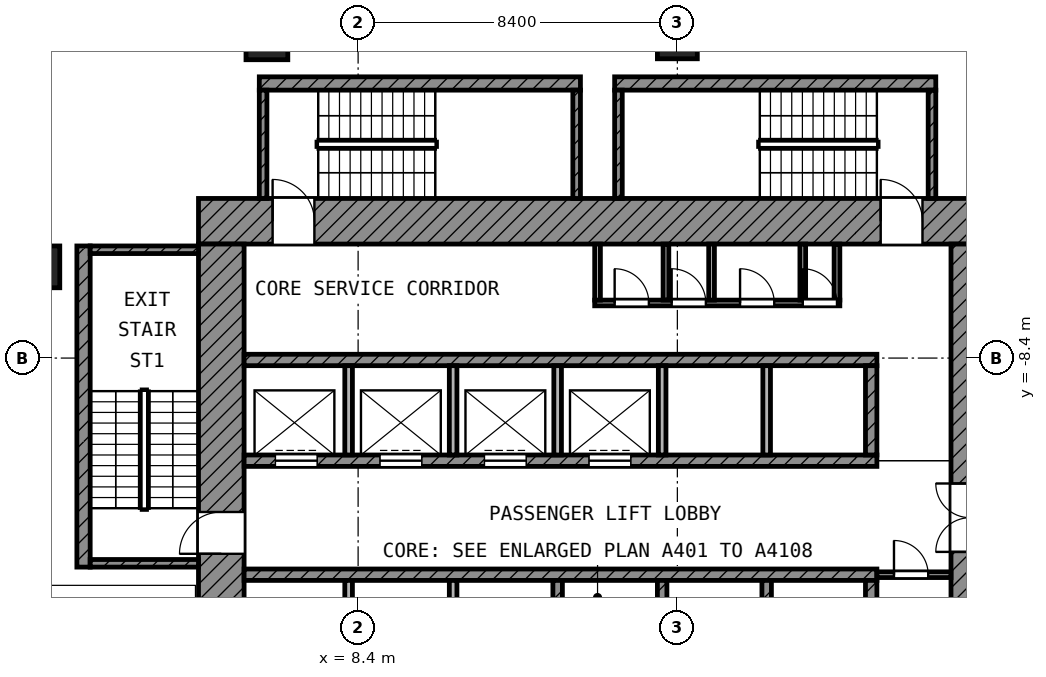
"""IFC4 building model, lengths in metres.
Left out: names, types, materials, properties, quantities, classifications, styles, units other than length and angle.
Written with IfcOpenShell. Run it as: python <this file> out.ifc"""

import sys

from ifc_helpers import new_model, si_unit, direction, frame, frame_2d, origin, origin_2d, place, context, subcontext, project, spatial, rectangle, extrude, element, fill, save


model = new_model("IFC4")
c1 = context("Model", 3, precision=1e-05, world=origin(), true_north=direction((0.0, 1.0)))
c2 = subcontext(c1, "Body", "Model", "MODEL_VIEW")
j1 = project(units=[si_unit("LENGTHUNIT", "METRE"), si_unit("PLANEANGLEUNIT", "RADIAN")], contexts=[c1])
p1 = place(None, origin())
s1 = spatial("IfcSite", under=j1, at=p1, CompositionType="ELEMENT")
p2 = place(p1, origin())
s2 = spatial("IfcBuilding", under=s1, at=p2, CompositionType="ELEMENT")
p3 = place(p2, frame((0.0, 0.0, 107.2)))
s3 = spatial("IfcBuildingStorey", under=s2, at=p3, CompositionType="ELEMENT", Elevation=107.2)
p4 = place(p3, frame((6.0, 0.0, 0.0), z_axis=(0.0, 0.0, 1.0), x_axis=(1.0, 0.0, 0.0)))
e1 = element("IfcColumn", 1, at=p4, inside=s3, PredefinedType="COLUMN", context=c2, shape_type="SweptSolid", body=[
    extrude(rectangle(XDim=1.1, YDim=1.1, at=origin_2d()), origin(), (0.0, 0.0, 1.0), 4.2),
])
p5 = place(p3, frame((16.8, 0.0, 0.0), z_axis=(0.0, 0.0, 1.0), x_axis=(1.0, 0.0, 0.0)))
e2 = element("IfcColumn", 2, at=p5, inside=s3, PredefinedType="COLUMN", context=c2, shape_type="SweptSolid", body=[
    extrude(rectangle(XDim=1.05, YDim=1.05, at=origin_2d()), origin(), (0.0, 0.0, 1.0), 4.2),
])
p6 = place(p3, frame((0.0, -6.0, 0.0), z_axis=(0.0, 0.0, 1.0), x_axis=(1.0, 0.0, 0.0)))
e3 = element("IfcColumn", 3, at=p6, inside=s3, PredefinedType="COLUMN", context=c2, shape_type="SweptSolid", body=[
    extrude(rectangle(XDim=1.1, YDim=1.1, at=origin_2d()), origin(), (0.0, 0.0, 1.0), 4.2),
])
p7 = place(p3, frame((4.2, -4.8, 0.0), z_axis=(0.0, 0.0, 1.0), x_axis=(1.0, 0.0, 0.0)))
e4 = element("IfcWall", 4, at=p7, inside=s3, PredefinedType="SHEAR", context=c2, shape_type="SweptSolid", body=[
    extrude(rectangle(XDim=20.8, YDim=1.2, at=frame_2d((10.4, 0.0))), origin(), (0.0, 0.0, 1.0), 3.6),
])
p8 = place(p7, frame((1.95, 0.0, 0.0)))
e5 = element("IfcOpeningElement", 5, at=p8, cuts=e4, PredefinedType="OPENING", context=c2, shape_type="SweptSolid", body=[
    extrude(rectangle(XDim=1.1, YDim=2.1, at=frame_2d((0.55, 1.05))), frame((0.0, 0.61, 0.0), z_axis=(0.0, -1.0, 0.0), x_axis=(1.0, 0.0, 0.0)), (0.0, 0.0, 1.0), 1.22),
])
p9 = place(p7, frame((17.95, 0.0, 0.0)))
e6 = element("IfcOpeningElement", 6, at=p9, cuts=e4, PredefinedType="OPENING", context=c2, shape_type="SweptSolid", body=[
    extrude(rectangle(XDim=1.1, YDim=2.1, at=frame_2d((0.55, 1.05))), frame((0.0, 0.61, 0.0), z_axis=(0.0, -1.0, 0.0), x_axis=(1.0, 0.0, 0.0)), (0.0, 0.0, 1.0), 1.22),
])
p10 = place(p3, frame((4.8, -25.0, 0.0), z_axis=(0.0, 0.0, 1.0), x_axis=(0.0, 1.0, 0.0)))
e7 = element("IfcWall", 7, at=p10, inside=s3, PredefinedType="SHEAR", context=c2, shape_type="SweptSolid", body=[
    extrude(rectangle(XDim=19.6, YDim=1.2, at=frame_2d((9.8, 0.0))), origin(), (0.0, 0.0, 1.0), 3.6),
])
p11 = place(p10, frame((11.45, 0.0, 0.0)))
e8 = element("IfcOpeningElement", 8, at=p11, cuts=e7, PredefinedType="OPENING", context=c2, shape_type="SweptSolid", body=[
    extrude(rectangle(XDim=1.1, YDim=2.1, at=frame_2d((0.55, 1.05))), frame((0.0, 0.61, 0.0), z_axis=(0.0, -1.0, 0.0), x_axis=(1.0, 0.0, 0.0)), (0.0, 0.0, 1.0), 1.22),
])
p12 = place(p10, frame((2.15, 0.0, 0.0)))
e9 = element("IfcOpeningElement", 9, at=p12, cuts=e7, PredefinedType="OPENING", context=c2, shape_type="SweptSolid", body=[
    extrude(rectangle(XDim=1.1, YDim=2.1, at=frame_2d((0.55, 1.05))), frame((0.0, 0.61, 0.0), z_axis=(0.0, -1.0, 0.0), x_axis=(1.0, 0.0, 0.0)), (0.0, 0.0, 1.0), 1.22),
])
p13 = place(p3, frame((24.5, -24.0, 0.0), z_axis=(0.0, 0.0, 1.0), x_axis=(0.0, 1.0, 0.0)))
e10 = element("IfcWall", 10, at=p13, inside=s3, PredefinedType="SHEAR", context=c2, shape_type="SweptSolid", body=[
    extrude(rectangle(XDim=18.6, YDim=1.0, at=frame_2d((9.3, 0.0))), origin(), (0.0, 0.0, 1.0), 3.6),
])
p14 = place(p13, frame((10.5, 0.0, 0.0)))
e11 = element("IfcOpeningElement", 11, at=p14, cuts=e10, PredefinedType="OPENING", context=c2, shape_type="SweptSolid", body=[
    extrude(rectangle(XDim=1.8, YDim=2.1, at=frame_2d((0.9, 1.05))), frame((0.0, 0.51, 0.0), z_axis=(0.0, -1.0, 0.0), x_axis=(1.0, 0.0, 0.0)), (0.0, 0.0, 1.0), 1.02),
])
p15 = place(p3, frame((5.4, -8.45, 0.0), z_axis=(0.0, 0.0, 1.0), x_axis=(1.0, 0.0, 0.0)))
e12 = element("IfcWall", 12, at=p15, inside=s3, PredefinedType="SHEAR", context=c2, shape_type="SweptSolid", body=[
    extrude(rectangle(XDim=16.65, YDim=0.3, at=frame_2d((8.325, 0.0))), origin(), (0.0, 0.0, 1.0), 3.6),
])
p16 = place(p3, frame((5.4, -11.1, 0.0), z_axis=(0.0, 0.0, 1.0), x_axis=(1.0, 0.0, 0.0)))
e13 = element("IfcWall", 13, at=p16, inside=s3, PredefinedType="SHEAR", context=c2, shape_type="SweptSolid", body=[
    extrude(rectangle(XDim=16.65, YDim=0.3, at=frame_2d((8.325, 0.0))), origin(), (0.0, 0.0, 1.0), 3.6),
])
p17 = place(p16, frame((0.825, 0.0, 0.0)))
e14 = element("IfcOpeningElement", 14, at=p17, cuts=e13, PredefinedType="OPENING", context=c2, shape_type="SweptSolid", body=[
    extrude(rectangle(XDim=1.1, YDim=2.1, at=frame_2d((0.55, 1.05))), frame((0.0, 0.16, 0.0), z_axis=(0.0, -1.0, 0.0), x_axis=(1.0, 0.0, 0.0)), (0.0, 0.0, 1.0), 0.32),
])
p18 = place(p16, frame((3.575, 0.0, 0.0)))
e15 = element("IfcOpeningElement", 15, at=p18, cuts=e13, PredefinedType="OPENING", context=c2, shape_type="SweptSolid", body=[
    extrude(rectangle(XDim=1.1, YDim=2.1, at=frame_2d((0.55, 1.05))), frame((0.0, 0.16, 0.0), z_axis=(0.0, -1.0, 0.0), x_axis=(1.0, 0.0, 0.0)), (0.0, 0.0, 1.0), 0.32),
])
p19 = place(p16, frame((6.325, 0.0, 0.0)))
e16 = element("IfcOpeningElement", 16, at=p19, cuts=e13, PredefinedType="OPENING", context=c2, shape_type="SweptSolid", body=[
    extrude(rectangle(XDim=1.1, YDim=2.1, at=frame_2d((0.55, 1.05))), frame((0.0, 0.16, 0.0), z_axis=(0.0, -1.0, 0.0), x_axis=(1.0, 0.0, 0.0)), (0.0, 0.0, 1.0), 0.32),
])
p20 = place(p16, frame((9.075, 0.0, 0.0)))
e17 = element("IfcOpeningElement", 17, at=p20, cuts=e13, PredefinedType="OPENING", context=c2, shape_type="SweptSolid", body=[
    extrude(rectangle(XDim=1.1, YDim=2.1, at=frame_2d((0.55, 1.05))), frame((0.0, 0.16, 0.0), z_axis=(0.0, -1.0, 0.0), x_axis=(1.0, 0.0, 0.0)), (0.0, 0.0, 1.0), 0.32),
])
p21 = place(p3, frame((5.4, -14.1, 0.0), z_axis=(0.0, 0.0, 1.0), x_axis=(1.0, 0.0, 0.0)))
e18 = element("IfcWall", 18, at=p21, inside=s3, PredefinedType="SHEAR", context=c2, shape_type="SweptSolid", body=[
    extrude(rectangle(XDim=16.65, YDim=0.3, at=frame_2d((8.325, 0.0))), origin(), (0.0, 0.0, 1.0), 3.6),
])
p22 = place(p3, frame((21.9, -10.95, 0.0), z_axis=(0.0, 0.0, 1.0), x_axis=(0.0, 1.0, 0.0)))
e19 = element("IfcWall", 19, at=p22, inside=s3, PredefinedType="SHEAR", context=c2, shape_type="SweptSolid", body=[
    extrude(rectangle(XDim=2.35, YDim=0.3, at=frame_2d((1.175, 0.0))), origin(), (0.0, 0.0, 1.0), 3.6),
])
p23 = place(p3, frame((21.9, -16.6, 0.0), z_axis=(0.0, 0.0, 1.0), x_axis=(0.0, 1.0, 0.0)))
e20 = element("IfcWall", 20, at=p23, inside=s3, PredefinedType="SHEAR", context=c2, shape_type="SweptSolid", body=[
    extrude(rectangle(XDim=2.35, YDim=0.3, at=frame_2d((1.175, 0.0))), origin(), (0.0, 0.0, 1.0), 3.6),
])
for number, where, z_axis, x_axis in (
    (21, (8.15, -10.95, 0.0), (0.0, 0.0, 1.0), (0.0, 1.0, 0.0)),
    (22, (10.9, -10.95, 0.0), (0.0, 0.0, 1.0), (0.0, 1.0, 0.0)),
    (23, (13.65, -10.95, 0.0), (0.0, 0.0, 1.0), (0.0, 1.0, 0.0)),
    (24, (16.4, -10.95, 0.0), (0.0, 0.0, 1.0), (0.0, 1.0, 0.0)),
    (25, (19.15, -10.95, 0.0), (0.0, 0.0, 1.0), (0.0, 1.0, 0.0)),
):
    element("IfcWall", number, at=place(p3, frame(where, z_axis=z_axis, x_axis=x_axis)), inside=s3, PredefinedType="PARTITIONING", context=c2, shape_type="SweptSolid", body=[
        extrude(rectangle(XDim=2.35, YDim=0.2, at=frame_2d((1.175, 0.0))), origin(), (0.0, 0.0, 1.0), 3.6),
    ])
for number, where, z_axis, x_axis in (
    (26, (8.15, -16.6, 0.0), (0.0, 0.0, 1.0), (0.0, 1.0, 0.0)),
    (27, (10.9, -16.6, 0.0), (0.0, 0.0, 1.0), (0.0, 1.0, 0.0)),
):
    element("IfcWall", number, at=place(p3, frame(where, z_axis=z_axis, x_axis=x_axis)), inside=s3, PredefinedType="PARTITIONING", context=c2, shape_type="SweptSolid", body=[
        extrude(rectangle(XDim=2.35, YDim=0.2, at=frame_2d((1.175, 0.0))), origin(), (0.0, 0.0, 1.0), 3.6),
    ])
for number, where, z_axis, x_axis in (
    (28, (13.65, -16.6, 0.0), (0.0, 0.0, 1.0), (0.0, 1.0, 0.0)),
    (29, (16.4, -16.6, 0.0), (0.0, 0.0, 1.0), (0.0, 1.0, 0.0)),
    (30, (19.15, -16.6, 0.0), (0.0, 0.0, 1.0), (0.0, 1.0, 0.0)),
):
    element("IfcWall", number, at=place(p3, frame(where, z_axis=z_axis, x_axis=x_axis)), inside=s3, PredefinedType="SHEAR", context=c2, shape_type="SweptSolid", body=[
        extrude(rectangle(XDim=2.35, YDim=0.25, at=frame_2d((1.175, 0.0))), origin(), (0.0, 0.0, 1.0), 3.6),
    ])
p24 = place(p3, frame((22.05, -14.1, 0.0), z_axis=(0.0, 0.0, 1.0), x_axis=(1.0, 0.0, 0.0)))
e31 = element("IfcWall", 31, at=p24, inside=s3, PredefinedType="PARTITIONING", context=c2, shape_type="SweptSolid", body=[
    extrude(rectangle(XDim=1.95, YDim=0.15, at=frame_2d((0.975, 0.0))), origin(), (0.0, 0.0, 1.0), 3.6),
])
p25 = place(p24, frame((0.45, 0.0, 0.0)))
e32 = element("IfcOpeningElement", 32, at=p25, cuts=e31, PredefinedType="OPENING", context=c2, shape_type="SweptSolid", body=[
    extrude(rectangle(XDim=0.9, YDim=2.1, at=frame_2d((0.45, 1.05))), frame((0.0, 0.085, 0.0), z_axis=(0.0, -1.0, 0.0), x_axis=(1.0, 0.0, 0.0)), (0.0, 0.0, 1.0), 0.17),
])
p26 = place(p3, frame((14.625, -6.95, 0.0), z_axis=(0.0, 0.0, 1.0), x_axis=(1.0, 0.0, 0.0)))
e33 = element("IfcWall", 33, at=p26, inside=s3, PredefinedType="PARTITIONING", context=c2, shape_type="SweptSolid", body=[
    extrude(rectangle(XDim=6.45, YDim=0.15, at=frame_2d((3.225, 0.0))), origin(), (0.0, 0.0, 1.0), 3.6),
])
p27 = place(p26, frame((0.525, 0.0, 0.0)))
e34 = element("IfcOpeningElement", 34, at=p27, cuts=e33, PredefinedType="OPENING", context=c2, shape_type="SweptSolid", body=[
    extrude(rectangle(XDim=0.9, YDim=2.1, at=frame_2d((0.45, 1.05))), frame((0.0, 0.085, 0.0), z_axis=(0.0, -1.0, 0.0), x_axis=(1.0, 0.0, 0.0)), (0.0, 0.0, 1.0), 0.17),
])
p28 = place(p26, frame((2.025, 0.0, 0.0)))
e35 = element("IfcOpeningElement", 35, at=p28, cuts=e33, PredefinedType="OPENING", context=c2, shape_type="SweptSolid", body=[
    extrude(rectangle(XDim=0.9, YDim=2.1, at=frame_2d((0.45, 1.05))), frame((0.0, 0.085, 0.0), z_axis=(0.0, -1.0, 0.0), x_axis=(1.0, 0.0, 0.0)), (0.0, 0.0, 1.0), 0.17),
])
p29 = place(p26, frame((3.825, 0.0, 0.0)))
e36 = element("IfcOpeningElement", 36, at=p29, cuts=e33, PredefinedType="OPENING", context=c2, shape_type="SweptSolid", body=[
    extrude(rectangle(XDim=0.9, YDim=2.1, at=frame_2d((0.45, 1.05))), frame((0.0, 0.085, 0.0), z_axis=(0.0, -1.0, 0.0), x_axis=(1.0, 0.0, 0.0)), (0.0, 0.0, 1.0), 0.17),
])
p30 = place(p26, frame((5.475, 0.0, 0.0)))
e37 = element("IfcOpeningElement", 37, at=p30, cuts=e33, PredefinedType="OPENING", context=c2, shape_type="SweptSolid", body=[
    extrude(rectangle(XDim=0.9, YDim=2.1, at=frame_2d((0.45, 1.05))), frame((0.0, 0.085, 0.0), z_axis=(0.0, -1.0, 0.0), x_axis=(1.0, 0.0, 0.0)), (0.0, 0.0, 1.0), 0.17),
])
for number, where, z_axis, x_axis in (
    (38, (14.7, -6.875, 0.0), (0.0, 0.0, 1.0), (0.0, 1.0, 0.0)),
    (39, (16.5, -6.875, 0.0), (0.0, 0.0, 1.0), (0.0, 1.0, 0.0)),
    (40, (17.7, -6.875, 0.0), (0.0, 0.0, 1.0), (0.0, 1.0, 0.0)),
    (41, (20.1, -6.875, 0.0), (0.0, 0.0, 1.0), (0.0, 1.0, 0.0)),
    (42, (21.0, -6.875, 0.0), (0.0, 0.0, 1.0), (0.0, 1.0, 0.0)),
):
    element("IfcWall", number, at=place(p3, frame(where, z_axis=z_axis, x_axis=x_axis)), inside=s3, PredefinedType="PARTITIONING", context=c2, shape_type="SweptSolid", body=[
        extrude(rectangle(XDim=1.475, YDim=0.15, at=frame_2d((0.738, 0.0))), origin(), (0.0, 0.0, 1.0), 3.6),
    ])
p31 = place(p3, frame((1.175, -13.9, 0.0), z_axis=(0.0, 0.0, 1.0), x_axis=(0.0, 1.0, 0.0)))
e43 = element("IfcWall", 43, at=p31, inside=s3, PredefinedType="SHEAR", context=c2, shape_type="SweptSolid", body=[
    extrude(rectangle(XDim=8.45, YDim=0.35, at=frame_2d((4.225, 0.0))), origin(), (0.0, 0.0, 1.0), 3.6),
])
for number, where, z_axis, x_axis in (
    (44, (1.35, -5.55, 0.0), (0.0, 0.0, 1.0), (1.0, 0.0, 0.0)),
    (45, (1.35, -13.8, 0.0), (0.0, 0.0, 1.0), (1.0, 0.0, 0.0)),
):
    element("IfcWall", number, at=place(p3, frame(where, z_axis=z_axis, x_axis=x_axis)), inside=s3, PredefinedType="SHEAR", context=c2, shape_type="SweptSolid", body=[
        extrude(rectangle(XDim=2.85, YDim=0.2, at=frame_2d((1.425, 0.0))), origin(), (0.0, 0.0, 1.0), 3.6),
    ])
p32 = place(p3, frame((5.8, -1.175, 0.0), z_axis=(0.0, 0.0, 1.0), x_axis=(1.0, 0.0, 0.0)))
e46 = element("IfcWall", 46, at=p32, inside=s3, PredefinedType="SHEAR", context=c2, shape_type="SweptSolid", body=[
    extrude(rectangle(XDim=8.45, YDim=0.35, at=frame_2d((4.225, 0.0))), origin(), (0.0, 0.0, 1.0), 3.6),
])
for number, where, z_axis, x_axis in (
    (47, (5.9, -4.2, 0.0), (0.0, 0.0, 1.0), (0.0, 1.0, 0.0)),
    (48, (14.15, -4.2, 0.0), (0.0, 0.0, 1.0), (0.0, 1.0, 0.0)),
):
    element("IfcWall", number, at=place(p3, frame(where, z_axis=z_axis, x_axis=x_axis)), inside=s3, PredefinedType="SHEAR", context=c2, shape_type="SweptSolid", body=[
        extrude(rectangle(XDim=2.85, YDim=0.2, at=frame_2d((1.425, 0.0))), origin(), (0.0, 0.0, 1.0), 3.6),
    ])
p33 = place(p3, frame((15.15, -1.175, 0.0), z_axis=(0.0, 0.0, 1.0), x_axis=(1.0, 0.0, 0.0)))
e49 = element("IfcWall", 49, at=p33, inside=s3, PredefinedType="SHEAR", context=c2, shape_type="SweptSolid", body=[
    extrude(rectangle(XDim=8.45, YDim=0.35, at=frame_2d((4.225, 0.0))), origin(), (0.0, 0.0, 1.0), 3.6),
])
for number, where, z_axis, x_axis in (
    (50, (15.25, -4.2, 0.0), (0.0, 0.0, 1.0), (0.0, 1.0, 0.0)),
    (51, (23.5, -4.2, 0.0), (0.0, 0.0, 1.0), (0.0, 1.0, 0.0)),
):
    element("IfcWall", number, at=place(p3, frame(where, z_axis=z_axis, x_axis=x_axis)), inside=s3, PredefinedType="SHEAR", context=c2, shape_type="SweptSolid", body=[
        extrude(rectangle(XDim=2.85, YDim=0.2, at=frame_2d((1.425, 0.0))), origin(), (0.0, 0.0, 1.0), 3.6),
    ])
p34 = place(p17, origin())
e52 = element("IfcDoor", 52, at=p34, inside=s3, OperationType="DOUBLE_DOOR_SLIDING", PredefinedType="DOOR", context=c2, shape_type="SweptSolid", body=[
    extrude(rectangle(XDim=1.1, YDim=2.1, at=frame_2d((0.55, 1.05))), frame((0.0, 0.025, 0.0), z_axis=(0.0, -1.0, 0.0), x_axis=(1.0, 0.0, 0.0)), (0.0, 0.0, 1.0), 0.05),
])
fill(e14, e52)
p35 = place(p18, origin())
e53 = element("IfcDoor", 53, at=p35, inside=s3, OperationType="DOUBLE_DOOR_SLIDING", PredefinedType="DOOR", context=c2, shape_type="SweptSolid", body=[
    extrude(rectangle(XDim=1.1, YDim=2.1, at=frame_2d((0.55, 1.05))), frame((0.0, 0.025, 0.0), z_axis=(0.0, -1.0, 0.0), x_axis=(1.0, 0.0, 0.0)), (0.0, 0.0, 1.0), 0.05),
])
fill(e15, e53)
p36 = place(p19, origin())
e54 = element("IfcDoor", 54, at=p36, inside=s3, OperationType="DOUBLE_DOOR_SLIDING", PredefinedType="DOOR", context=c2, shape_type="SweptSolid", body=[
    extrude(rectangle(XDim=1.1, YDim=2.1, at=frame_2d((0.55, 1.05))), frame((0.0, 0.025, 0.0), z_axis=(0.0, -1.0, 0.0), x_axis=(1.0, 0.0, 0.0)), (0.0, 0.0, 1.0), 0.05),
])
fill(e16, e54)
p37 = place(p20, origin())
e55 = element("IfcDoor", 55, at=p37, inside=s3, OperationType="DOUBLE_DOOR_SLIDING", PredefinedType="DOOR", context=c2, shape_type="SweptSolid", body=[
    extrude(rectangle(XDim=1.1, YDim=2.1, at=frame_2d((0.55, 1.05))), frame((0.0, 0.025, 0.0), z_axis=(0.0, -1.0, 0.0), x_axis=(1.0, 0.0, 0.0)), (0.0, 0.0, 1.0), 0.05),
])
fill(e17, e55)
p38 = place(p11, origin())
e56 = element("IfcDoor", 56, at=p38, inside=s3, OperationType="SINGLE_SWING_LEFT", PredefinedType="DOOR", context=c2, shape_type="SweptSolid", body=[
    extrude(rectangle(XDim=1.1, YDim=2.1, at=frame_2d((0.55, 1.05))), frame((0.0, 0.025, 0.0), z_axis=(0.0, -1.0, 0.0), x_axis=(1.0, 0.0, 0.0)), (0.0, 0.0, 1.0), 0.05),
])
fill(e8, e56)
p39 = place(p8, origin())
e57 = element("IfcDoor", 57, at=p39, inside=s3, OperationType="SINGLE_SWING_LEFT", PredefinedType="DOOR", context=c2, shape_type="SweptSolid", body=[
    extrude(rectangle(XDim=1.1, YDim=2.1, at=frame_2d((0.55, 1.05))), frame((0.0, 0.025, 0.0), z_axis=(0.0, -1.0, 0.0), x_axis=(1.0, 0.0, 0.0)), (0.0, 0.0, 1.0), 0.05),
])
fill(e5, e57)
p40 = place(p9, origin())
e58 = element("IfcDoor", 58, at=p40, inside=s3, OperationType="SINGLE_SWING_LEFT", PredefinedType="DOOR", context=c2, shape_type="SweptSolid", body=[
    extrude(rectangle(XDim=1.1, YDim=2.1, at=frame_2d((0.55, 1.05))), frame((0.0, 0.025, 0.0), z_axis=(0.0, -1.0, 0.0), x_axis=(1.0, 0.0, 0.0)), (0.0, 0.0, 1.0), 0.05),
])
fill(e6, e58)
p41 = place(p27, origin())
e59 = element("IfcDoor", 59, at=p41, inside=s3, OperationType="SINGLE_SWING_LEFT", PredefinedType="DOOR", context=c2, shape_type="SweptSolid", body=[
    extrude(rectangle(XDim=0.9, YDim=2.1, at=frame_2d((0.45, 1.05))), frame((0.0, 0.025, 0.0), z_axis=(0.0, -1.0, 0.0), x_axis=(1.0, 0.0, 0.0)), (0.0, 0.0, 1.0), 0.05),
])
fill(e34, e59)
p42 = place(p28, origin())
e60 = element("IfcDoor", 60, at=p42, inside=s3, OperationType="SINGLE_SWING_LEFT", PredefinedType="DOOR", context=c2, shape_type="SweptSolid", body=[
    extrude(rectangle(XDim=0.9, YDim=2.1, at=frame_2d((0.45, 1.05))), frame((0.0, 0.025, 0.0), z_axis=(0.0, -1.0, 0.0), x_axis=(1.0, 0.0, 0.0)), (0.0, 0.0, 1.0), 0.05),
])
fill(e35, e60)
p43 = place(p29, origin())
e61 = element("IfcDoor", 61, at=p43, inside=s3, OperationType="SINGLE_SWING_LEFT", PredefinedType="DOOR", context=c2, shape_type="SweptSolid", body=[
    extrude(rectangle(XDim=0.9, YDim=2.1, at=frame_2d((0.45, 1.05))), frame((0.0, 0.025, 0.0), z_axis=(0.0, -1.0, 0.0), x_axis=(1.0, 0.0, 0.0)), (0.0, 0.0, 1.0), 0.05),
])
fill(e36, e61)
p44 = place(p30, origin())
e62 = element("IfcDoor", 62, at=p44, inside=s3, OperationType="SINGLE_SWING_LEFT", PredefinedType="DOOR", context=c2, shape_type="SweptSolid", body=[
    extrude(rectangle(XDim=0.9, YDim=2.1, at=frame_2d((0.45, 1.05))), frame((0.0, 0.025, 0.0), z_axis=(0.0, -1.0, 0.0), x_axis=(1.0, 0.0, 0.0)), (0.0, 0.0, 1.0), 0.05),
])
fill(e37, e62)
p45 = place(p25, origin())
e63 = element("IfcDoor", 63, at=p45, inside=s3, OperationType="SINGLE_SWING_LEFT", PredefinedType="DOOR", context=c2, shape_type="SweptSolid", body=[
    extrude(rectangle(XDim=0.9, YDim=2.1, at=frame_2d((0.45, 1.05))), frame((0.0, 0.025, 0.0), z_axis=(0.0, -1.0, 0.0), x_axis=(1.0, 0.0, 0.0)), (0.0, 0.0, 1.0), 0.05),
])
fill(e32, e63)
save(model, sys.argv[1])
